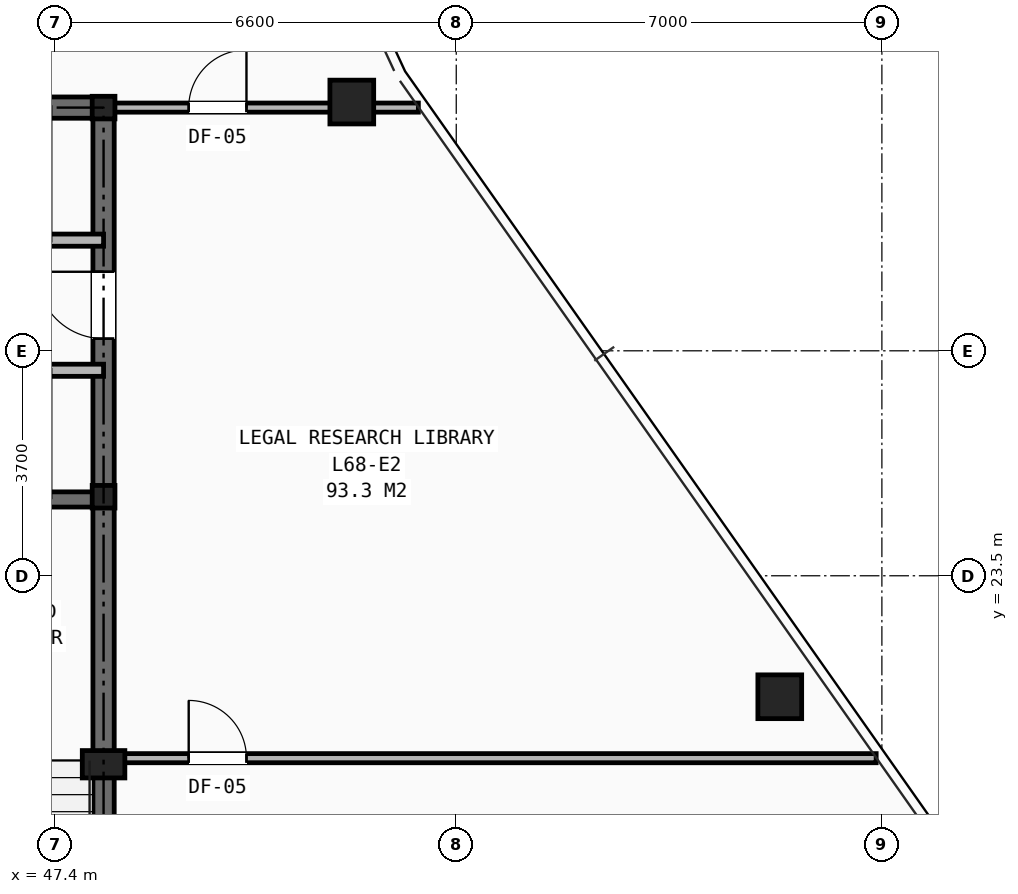
"""IFC4 building model, lengths in metres.
Left out: names, types, materials, properties, quantities, classifications, styles, units other than length and angle.
Written with IfcOpenShell. Run it as: python <this file> out.ifc"""

import sys

from ifc_helpers import new_model, si_unit, direction, frame, frame_2d, origin, origin_2d, place, context, subcontext, project, spatial, rectangle, hollow_rectangle, i_section, extrude, element, fill, save


model = new_model("IFC4")
c1 = context("Model", 3, precision=1e-05, world=origin(), true_north=direction((0.0, 1.0)))
c2 = subcontext(c1, "Body", "Model", "MODEL_VIEW")
j1 = project(units=[si_unit("LENGTHUNIT", "METRE"), si_unit("PLANEANGLEUNIT", "RADIAN")], contexts=[c1])
p1 = place(None, origin())
s1 = spatial("IfcSite", under=j1, at=p1, CompositionType="ELEMENT")
p2 = place(p1, origin())
s2 = spatial("IfcBuilding", under=s1, at=p2, CompositionType="ELEMENT")
p3 = place(p2, frame((0.0, 0.0, 239.9)))
s3 = spatial("IfcBuildingStorey", under=s2, at=p3, CompositionType="ELEMENT", Elevation=239.9)
for number, where, z_axis, x_axis in (
    (1, (48.2, 24.8, 0.0), (0.0, 0.0, 1.0), (1.0, 0.0, 0.0)),
    (2, (48.2, 31.2, 0.0), (0.0, 0.0, 1.0), (1.0, 0.0, 0.0)),
):
    element("IfcColumn", number, at=place(p3, frame(where, z_axis=z_axis, x_axis=x_axis)), inside=s3, PredefinedType="COLUMN", context=c2, shape_type="SweptSolid", body=[
        extrude(i_section(OverallWidth=0.374, OverallDepth=0.372, WebThickness=0.016, FlangeThickness=0.026, at=origin_2d()), origin(), (0.0, 0.0, 1.0), 3.5),
    ])
p4 = place(p3, frame((48.2, 20.4, 0.0), z_axis=(0.0, 0.0, 1.0), x_axis=(1.0, 0.0, 0.0)))
e3 = element("IfcColumn", 3, at=p4, inside=s3, PredefinedType="PILASTER", context=c2, shape_type="SweptSolid", body=[
    extrude(rectangle(XDim=0.7, YDim=0.45, at=origin_2d()), origin(), (0.0, 0.0, 1.0), 3.5),
])
for number, where, z_axis, x_axis in (
    (4, (59.321, 21.51, 0.0), (0.0, 0.0, 1.0), (1.0, 0.0, 0.0)),
    (5, (52.282, 31.291, 0.0), (0.0, 0.0, 1.0), (1.0, 0.0, 0.0)),
):
    element("IfcColumn", number, at=place(p3, frame(where, z_axis=z_axis, x_axis=x_axis)), inside=s3, PredefinedType="COLUMN", context=c2, shape_type="SweptSolid", body=[
        extrude(hollow_rectangle(XDim=0.72, YDim=0.72, WallThickness=0.05, at=origin_2d()), origin(), (0.0, 0.0, 1.0), 3.5),
    ])
p5 = place(p3, frame((31.8, 31.2, 0.0), z_axis=(0.0, 0.0, 1.0), x_axis=(1.0, 0.0, 0.0)))
e6 = element("IfcWall", 6, at=p5, inside=s3, PredefinedType="SHEAR", context=c2, shape_type="SweptSolid", body=[
    extrude(rectangle(XDim=16.4, YDim=0.35, at=frame_2d((8.2, 0.0))), origin(), (0.0, 0.0, 1.0), 3.25),
])
p6 = place(p3, frame((48.2, 16.4, 0.0), z_axis=(0.0, 0.0, 1.0), x_axis=(0.0, 1.0, 0.0)))
e7 = element("IfcWall", 7, at=p6, inside=s3, PredefinedType="SHEAR", context=c2, shape_type="SweptSolid", body=[
    extrude(rectangle(XDim=14.8, YDim=0.35, at=frame_2d((7.4, 0.0))), origin(), (0.0, 0.0, 1.0), 3.25),
])
p7 = place(p6, frame((11.0, 0.0, 0.0)))
e8 = element("IfcOpeningElement", 8, at=p7, cuts=e7, PredefinedType="OPENING", context=c2, shape_type="SweptSolid", body=[
    extrude(rectangle(XDim=1.1, YDim=2.15, at=frame_2d((0.55, 1.075))), frame((0.0, 0.185, 0.0), z_axis=(0.0, -1.0, 0.0), x_axis=(1.0, 0.0, 0.0)), (0.0, 0.0, 1.0), 0.37),
])
p8 = place(p3, frame((44.955, 24.755, 0.0), z_axis=(0.0, 0.0, 1.0), x_axis=(1.0, 0.0, 0.0)))
e9 = element("IfcWall", 9, at=p8, inside=s3, PredefinedType="SHEAR", context=c2, shape_type="SweptSolid", body=[
    extrude(rectangle(XDim=3.245, YDim=0.25, at=frame_2d((1.623, 0.0))), origin(), (0.0, 0.0, 1.0), 3.25),
])
p9 = place(p3, frame((31.8, 29.02, 0.0), z_axis=(0.0, 0.0, 1.0), x_axis=(1.0, 0.0, 0.0)))
e10 = element("IfcWall", 10, at=p9, inside=s3, PredefinedType="SOLIDWALL", context=c2, shape_type="SweptSolid", body=[
    extrude(rectangle(XDim=16.4, YDim=0.2, at=frame_2d((8.2, 0.0))), origin(), (0.0, 0.0, 1.0), 2.705),
])
p10 = place(p9, frame((0.55, 0.0, 0.0)))
e11 = element("IfcOpeningElement", 11, at=p10, cuts=e10, PredefinedType="OPENING", context=c2, shape_type="SweptSolid", body=[
    extrude(rectangle(XDim=0.85, YDim=2.05, at=frame_2d((0.425, 1.025))), frame((0.0, 0.11, 0.0), z_axis=(0.0, -1.0, 0.0), x_axis=(1.0, 0.0, 0.0)), (0.0, 0.0, 1.0), 0.22),
])
p11 = place(p9, frame((5.94, 0.0, 0.0)))
e12 = element("IfcOpeningElement", 12, at=p11, cuts=e10, PredefinedType="OPENING", context=c2, shape_type="SweptSolid", body=[
    extrude(rectangle(XDim=0.9, YDim=2.1, at=frame_2d((0.45, 1.05))), frame((0.0, 0.11, 0.0), z_axis=(0.0, -1.0, 0.0), x_axis=(1.0, 0.0, 0.0)), (0.0, 0.0, 1.0), 0.22),
])
p12 = place(p9, frame((11.41, 0.0, 0.0)))
e13 = element("IfcOpeningElement", 13, at=p12, cuts=e10, PredefinedType="OPENING", context=c2, shape_type="SweptSolid", body=[
    extrude(rectangle(XDim=1.1, YDim=2.15, at=frame_2d((0.55, 1.075))), frame((0.0, 0.11, 0.0), z_axis=(0.0, -1.0, 0.0), x_axis=(1.0, 0.0, 0.0)), (0.0, 0.0, 1.0), 0.22),
])
p13 = place(p9, frame((13.73, 0.0, 0.0)))
e14 = element("IfcOpeningElement", 14, at=p13, cuts=e10, PredefinedType="OPENING", context=c2, shape_type="SweptSolid", body=[
    extrude(rectangle(XDim=1.1, YDim=2.15, at=frame_2d((0.55, 1.075))), frame((0.0, 0.11, 0.0), z_axis=(0.0, -1.0, 0.0), x_axis=(1.0, 0.0, 0.0)), (0.0, 0.0, 1.0), 0.22),
])
p14 = place(p3, frame((33.82, 26.88, 0.0), z_axis=(0.0, 0.0, 1.0), x_axis=(1.0, 0.0, 0.0)))
e15 = element("IfcWall", 15, at=p14, inside=s3, PredefinedType="SOLIDWALL", context=c2, shape_type="SweptSolid", body=[
    extrude(rectangle(XDim=14.38, YDim=0.2, at=frame_2d((7.19, 0.0))), origin(), (0.0, 0.0, 1.0), 2.705),
])
p15 = place(p14, frame((3.92, 0.0, 0.0)))
e16 = element("IfcOpeningElement", 16, at=p15, cuts=e15, PredefinedType="OPENING", context=c2, shape_type="SweptSolid", body=[
    extrude(rectangle(XDim=0.9, YDim=2.1, at=frame_2d((0.45, 1.05))), frame((0.0, 0.11, 0.0), z_axis=(0.0, -1.0, 0.0), x_axis=(1.0, 0.0, 0.0)), (0.0, 0.0, 1.0), 0.22),
])
p16 = place(p14, frame((9.39, 0.0, 0.0)))
e17 = element("IfcOpeningElement", 17, at=p16, cuts=e15, PredefinedType="OPENING", context=c2, shape_type="SweptSolid", body=[
    extrude(rectangle(XDim=1.1, YDim=2.15, at=frame_2d((0.55, 1.075))), frame((0.0, 0.11, 0.0), z_axis=(0.0, -1.0, 0.0), x_axis=(1.0, 0.0, 0.0)), (0.0, 0.0, 1.0), 0.22),
])
p17 = place(p14, frame((11.71, 0.0, 0.0)))
e18 = element("IfcOpeningElement", 18, at=p17, cuts=e15, PredefinedType="OPENING", context=c2, shape_type="SweptSolid", body=[
    extrude(rectangle(XDim=1.1, YDim=2.15, at=frame_2d((0.55, 1.075))), frame((0.0, 0.11, 0.0), z_axis=(0.0, -1.0, 0.0), x_axis=(1.0, 0.0, 0.0)), (0.0, 0.0, 1.0), 0.22),
])
p18 = place(p3, frame((48.2, 20.5, 0.0), z_axis=(0.0, 0.0, 1.0), x_axis=(1.0, 0.0, 0.0)))
e19 = element("IfcWall", 19, at=p18, inside=s3, PredefinedType="PARTITIONING", context=c2, shape_type="SweptSolid", body=[
    extrude(rectangle(XDim=12.706, YDim=0.15, at=frame_2d((6.353, 0.0))), origin(), (0.0, 0.0, 1.0), 2.265),
])
p19 = place(p18, frame((1.4, 0.0, 0.0)))
e20 = element("IfcOpeningElement", 20, at=p19, cuts=e19, PredefinedType="OPENING", context=c2, shape_type="SweptSolid", body=[
    extrude(rectangle(XDim=0.95, YDim=2.1, at=frame_2d((0.475, 1.05))), frame((0.0, 0.085, 0.0), z_axis=(0.0, -1.0, 0.0), x_axis=(1.0, 0.0, 0.0)), (0.0, 0.0, 1.0), 0.17),
])
p20 = place(p3, frame((48.2, 31.2, 0.0), z_axis=(0.0, 0.0, 1.0), x_axis=(1.0, 0.0, 0.0)))
e21 = element("IfcWall", 21, at=p20, inside=s3, PredefinedType="PARTITIONING", context=c2, shape_type="SweptSolid", body=[
    extrude(rectangle(XDim=5.177, YDim=0.15, at=frame_2d((2.589, 0.0))), origin(), (0.0, 0.0, 1.0), 2.265),
])
p21 = place(p20, frame((1.4, 0.0, 0.0)))
e22 = element("IfcOpeningElement", 22, at=p21, cuts=e21, PredefinedType="OPENING", context=c2, shape_type="SweptSolid", body=[
    extrude(rectangle(XDim=0.95, YDim=2.1, at=frame_2d((0.475, 1.05))), frame((0.0, 0.085, 0.0), z_axis=(0.0, -1.0, 0.0), x_axis=(1.0, 0.0, 0.0)), (0.0, 0.0, 1.0), 0.17),
])
p22 = place(p7, origin())
e23 = element("IfcDoor", 23, at=p22, inside=s3, OperationType="SINGLE_SWING_RIGHT", PredefinedType="DOOR", context=c2, shape_type="SweptSolid", body=[
    extrude(rectangle(XDim=1.1, YDim=2.15, at=frame_2d((0.55, 1.075))), frame((0.0, 0.025, 0.0), z_axis=(0.0, -1.0, 0.0), x_axis=(1.0, 0.0, 0.0)), (0.0, 0.0, 1.0), 0.05),
])
fill(e8, e23)
p23 = place(p19, origin())
e24 = element("IfcDoor", 24, at=p23, inside=s3, OperationType="SINGLE_SWING_LEFT", PredefinedType="DOOR", context=c2, shape_type="SweptSolid", body=[
    extrude(rectangle(XDim=0.95, YDim=2.1, at=frame_2d((0.475, 1.05))), frame((0.0, 0.025, 0.0), z_axis=(0.0, -1.0, 0.0), x_axis=(1.0, 0.0, 0.0)), (0.0, 0.0, 1.0), 0.05),
])
fill(e20, e24)
p24 = place(p21, origin())
e25 = element("IfcDoor", 25, at=p24, inside=s3, OperationType="SINGLE_SWING_RIGHT", PredefinedType="DOOR", context=c2, shape_type="SweptSolid", body=[
    extrude(rectangle(XDim=0.95, YDim=2.1, at=frame_2d((0.475, 1.05))), frame((0.0, 0.025, 0.0), z_axis=(0.0, -1.0, 0.0), x_axis=(1.0, 0.0, 0.0)), (0.0, 0.0, 1.0), 0.05),
])
fill(e22, e25)
save(model, sys.argv[1])
